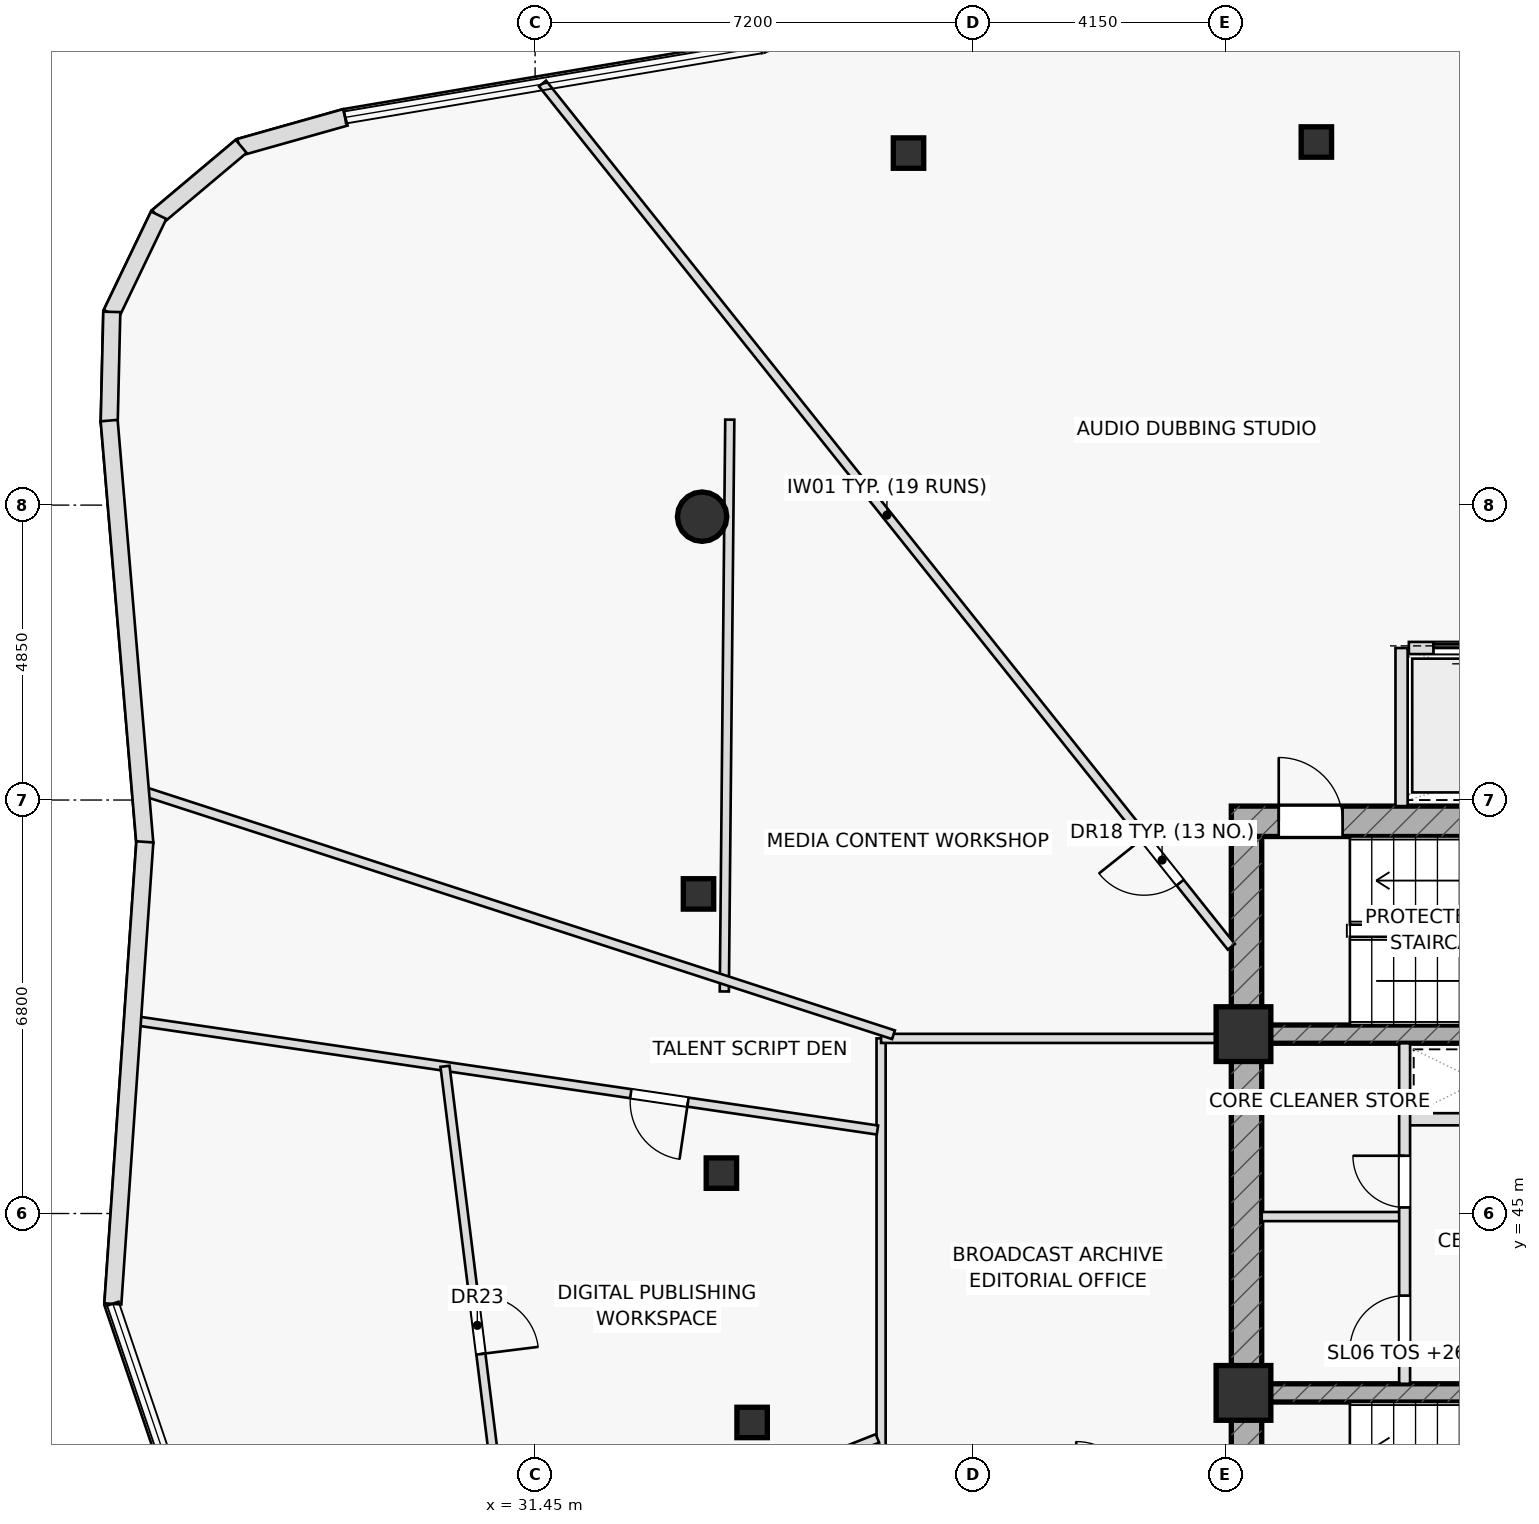
"""IFC4 building model, lengths in metres.
Left out: names, types, materials, properties, quantities, classifications, styles, units other than length and angle.
Written with IfcOpenShell. Run it as: python <this file> out.ifc"""

import sys

from ifc_helpers import new_model, si_unit, direction, frame, frame_2d, origin, origin_2d, place, context, subcontext, project, spatial, rectangle, hollow_rectangle, hollow_circle, extrude, element, fill, save


model = new_model("IFC4")
c1 = context("Model", 3, precision=1e-05, world=origin(), true_north=direction((0.0, 1.0)))
c2 = subcontext(c1, "Body", "Model", "MODEL_VIEW")
j1 = project(units=[si_unit("LENGTHUNIT", "METRE"), si_unit("PLANEANGLEUNIT", "RADIAN")], contexts=[c1])
p1 = place(None, origin())
s1 = spatial("IfcSite", under=j1, at=p1, CompositionType="ELEMENT")
p2 = place(p1, origin())
s2 = spatial("IfcBuilding", under=s1, at=p2, CompositionType="ELEMENT")
p3 = place(p2, frame((0.0, 0.0, 261.65)))
s3 = spatial("IfcBuildingStorey", under=s2, at=p3, CompositionType="ELEMENT", Elevation=261.65)
p4 = place(p3, frame((42.9, 51.45, 0.0), z_axis=(0.0, 0.0, 1.0), x_axis=(1.0, 0.0, 0.0)))
e1 = element("IfcWall", 1, at=p4, inside=s3, PredefinedType="SHEAR", context=c2, shape_type="SweptSolid", body=[
    extrude(rectangle(XDim=14.2, YDim=0.5, at=frame_2d((7.1, 0.0))), origin(), (0.0, 0.0, 1.0), 3.65),
])
p5 = place(p4, frame((0.78, 0.0, 0.0)))
e2 = element("IfcOpeningElement", 2, at=p5, cuts=e1, PredefinedType="OPENING", context=c2, shape_type="SweptSolid", body=[
    extrude(rectangle(XDim=1.05, YDim=2.2, at=frame_2d((0.525, 1.1))), frame((0.0, 0.26, 0.0), z_axis=(0.0, -1.0, 0.0), x_axis=(1.0, 0.0, 0.0)), (0.0, 0.0, 1.0), 0.52),
])
p6 = place(p3, frame((43.15, 38.8, 0.0), z_axis=(0.0, 0.0, 1.0), x_axis=(0.0, 1.0, 0.0)))
e3 = element("IfcWall", 3, at=p6, inside=s3, PredefinedType="SHEAR", context=c2, shape_type="SweptSolid", body=[
    extrude(rectangle(XDim=12.4, YDim=0.5, at=frame_2d((6.2, 0.0))), origin(), (0.0, 0.0, 1.0), 3.65),
])
p7 = place(p3, frame((43.4, 47.95, 0.0), z_axis=(0.0, 0.0, 1.0), x_axis=(1.0, 0.0, 0.0)))
e4 = element("IfcWall", 4, at=p7, inside=s3, PredefinedType="SHEAR", context=c2, shape_type="SweptSolid", body=[
    extrude(rectangle(XDim=13.2, YDim=0.3, at=frame_2d((6.6, 0.0))), origin(), (0.0, 0.0, 1.0), 3.65),
])
p8 = place(p7, frame((8.345, 0.0, 0.0)))
e5 = element("IfcOpeningElement", 5, at=p8, cuts=e4, PredefinedType="OPENING", context=c2, shape_type="SweptSolid", body=[
    extrude(rectangle(XDim=1.15, YDim=2.2, at=frame_2d((0.575, 1.1))), frame((0.0, 0.16, 0.0), z_axis=(0.0, -1.0, 0.0), x_axis=(1.0, 0.0, 0.0)), (0.0, 0.0, 1.0), 0.32),
])
p9 = place(p7, frame((10.065, 0.0, 0.0)))
e6 = element("IfcOpeningElement", 6, at=p9, cuts=e4, PredefinedType="OPENING", context=c2, shape_type="SweptSolid", body=[
    extrude(rectangle(XDim=1.15, YDim=2.2, at=frame_2d((0.575, 1.1))), frame((0.0, 0.16, 0.0), z_axis=(0.0, -1.0, 0.0), x_axis=(1.0, 0.0, 0.0)), (0.0, 0.0, 1.0), 0.32),
])
p10 = place(p7, frame((11.645, 0.0, 0.0)))
e7 = element("IfcOpeningElement", 7, at=p10, cuts=e4, PredefinedType="OPENING", context=c2, shape_type="SweptSolid", body=[
    extrude(rectangle(XDim=1.15, YDim=2.2, at=frame_2d((0.575, 1.1))), frame((0.0, 0.16, 0.0), z_axis=(0.0, -1.0, 0.0), x_axis=(1.0, 0.0, 0.0)), (0.0, 0.0, 1.0), 0.32),
])
p11 = place(p3, frame((43.4, 42.05, 0.0), z_axis=(0.0, 0.0, 1.0), x_axis=(1.0, 0.0, 0.0)))
e8 = element("IfcWall", 8, at=p11, inside=s3, PredefinedType="SHEAR", context=c2, shape_type="SweptSolid", body=[
    extrude(rectangle(XDim=13.2, YDim=0.3, at=frame_2d((6.6, 0.0))), origin(), (0.0, 0.0, 1.0), 3.65),
])
p12 = place(p11, frame((9.1, 0.0, 0.0)))
e9 = element("IfcOpeningElement", 9, at=p12, cuts=e8, PredefinedType="OPENING", context=c2, shape_type="SweptSolid", body=[
    extrude(rectangle(XDim=1.5, YDim=2.2, at=frame_2d((0.75, 1.1))), frame((0.0, 0.16, 0.0), z_axis=(0.0, -1.0, 0.0), x_axis=(1.0, 0.0, 0.0)), (0.0, 0.0, 1.0), 0.32),
])
for number, where, z_axis, x_axis in (
    (10, (43.1, 47.95, 0.0), (0.0, 0.0, 1.0), (1.0, 0.0, 0.0)),
    (11, (43.1, 42.05, 0.0), (0.0, 0.0, 1.0), (1.0, 0.0, 0.0)),
):
    element("IfcColumn", number, at=place(p3, frame(where, z_axis=z_axis, x_axis=x_axis)), inside=s3, PredefinedType="COLUMN", context=c2, shape_type="SweptSolid", body=[
        extrude(rectangle(XDim=0.9, YDim=0.9, at=origin_2d()), origin(), (0.0, 0.0, 1.0), 3.65),
    ])
p13 = place(p3, frame((34.196, 56.46, 0.0), z_axis=(0.0, 0.0, 1.0), x_axis=(1.0, 0.0, 0.0)))
e12 = element("IfcColumn", 12, at=p13, inside=s3, PredefinedType="COLUMN", context=c2, shape_type="SweptSolid", body=[
    extrude(hollow_circle(Radius=0.406, WallThickness=0.036, at=origin_2d()), origin(), (0.0, 0.0, 1.0), 3.65),
])
for number, where, z_axis, x_axis in (
    (13, (34.137, 50.256, 0.0), (0.0, 0.0, 1.0), (1.0, 0.0, 0.0)),
    (14, (34.514, 45.665, 0.0), (0.0, 0.0, 1.0), (1.0, 0.0, 0.0)),
    (15, (35.019, 41.564, 0.0), (0.0, 0.0, 1.0), (1.0, 0.0, 0.0)),
    (16, (44.299, 62.621, 0.0), (0.0, 0.0, 1.0), (1.0, 0.0, 0.0)),
    (17, (37.591, 62.439, 0.0), (0.0, 0.0, 1.0), (1.0, 0.0, 0.0)),
):
    element("IfcColumn", number, at=place(p3, frame(where, z_axis=z_axis, x_axis=x_axis)), inside=s3, PredefinedType="COLUMN", context=c2, shape_type="SweptSolid", body=[
        extrude(hollow_rectangle(XDim=0.5, YDim=0.5, WallThickness=0.03, at=origin_2d()), origin(), (0.0, 0.0, 1.0), 3.65),
    ])
p14 = place(p3, frame((45.7, 51.7, 0.0), z_axis=(0.0, 0.0, 1.0), x_axis=(0.0, 1.0, 0.0)))
e18 = element("IfcWall", 18, at=p14, inside=s3, PredefinedType="PARTITIONING", context=c2, shape_type="SweptSolid", body=[
    extrude(rectangle(XDim=2.6, YDim=0.2, at=frame_2d((1.3, 0.0))), origin(), (0.0, 0.0, 1.0), 3.65),
])
p15 = place(p3, frame((45.75, 46.55, 0.0), z_axis=(0.0, 0.0, 1.0), x_axis=(1.0, 0.0, 0.0)))
e19 = element("IfcWall", 19, at=p15, inside=s3, PredefinedType="PARTITIONING", context=c2, shape_type="SweptSolid", body=[
    extrude(rectangle(XDim=2.4, YDim=0.2, at=frame_2d((1.2, 0.0))), origin(), (0.0, 0.0, 1.0), 3.65),
])
p16 = place(p3, frame((43.4, 44.95, 0.0), z_axis=(0.0, 0.0, 1.0), x_axis=(1.0, 0.0, 0.0)))
e20 = element("IfcWall", 20, at=p16, inside=s3, PredefinedType="PARTITIONING", context=c2, shape_type="SweptSolid", body=[
    extrude(rectangle(XDim=2.35, YDim=0.15, at=frame_2d((1.175, 0.0))), origin(), (0.0, 0.0, 1.0), 3.65),
])
p17 = place(p3, frame((45.75, 42.2, 0.0), z_axis=(0.0, 0.0, 1.0), x_axis=(0.0, 1.0, 0.0)))
e21 = element("IfcWall", 21, at=p17, inside=s3, PredefinedType="PARTITIONING", context=c2, shape_type="SweptSolid", body=[
    extrude(rectangle(XDim=5.6, YDim=0.18, at=frame_2d((2.8, 0.0))), origin(), (0.0, 0.0, 1.0), 3.65),
])
p18 = place(p17, frame((0.55, 0.0, 0.0)))
e22 = element("IfcOpeningElement", 22, at=p18, cuts=e21, PredefinedType="OPENING", context=c2, shape_type="SweptSolid", body=[
    extrude(rectangle(XDim=0.9, YDim=2.05, at=frame_2d((0.45, 1.025))), frame((0.0, 0.1, 0.0), z_axis=(0.0, -1.0, 0.0), x_axis=(1.0, 0.0, 0.0)), (0.0, 0.0, 1.0), 0.2),
])
p19 = place(p17, frame((2.9, 0.0, 0.0)))
e23 = element("IfcOpeningElement", 23, at=p19, cuts=e21, PredefinedType="OPENING", context=c2, shape_type="SweptSolid", body=[
    extrude(rectangle(XDim=0.85, YDim=2.05, at=frame_2d((0.425, 1.025))), frame((0.0, 0.1, 0.0), z_axis=(0.0, -1.0, 0.0), x_axis=(1.0, 0.0, 0.0)), (0.0, 0.0, 1.0), 0.2),
])
p20 = place(p3, frame((34.652, 58.056, 0.0), z_axis=(0.0, 0.0, 1.0), x_axis=(-0.009553538759, -0.999954363907, 0.0)))
e24 = element("IfcWall", 24, at=p20, inside=s3, PredefinedType="PARTITIONING", context=c2, shape_type="SweptSolid", body=[
    extrude(rectangle(XDim=9.404, YDim=0.15, at=frame_2d((4.702, 0.0))), origin(), (0.0, 0.0, 1.0), 3.175),
])
p21 = place(p3, frame((37.14, 40.3, 0.0), z_axis=(0.0, 0.0, 1.0), x_axis=(0.0, 1.0, 0.0)))
e25 = element("IfcWall", 25, at=p21, inside=s3, PredefinedType="PARTITIONING", context=c2, shape_type="SweptSolid", body=[
    extrude(rectangle(XDim=7.58, YDim=0.15, at=frame_2d((3.79, 0.0))), origin(), (0.0, 0.0, 1.0), 3.65),
])
p22 = place(p3, frame((37.14, 47.88, 0.0), z_axis=(0.0, 0.0, 1.0), x_axis=(1.0, 0.0, 0.0)))
e26 = element("IfcWall", 26, at=p22, inside=s3, PredefinedType="PARTITIONING", context=c2, shape_type="SweptSolid", body=[
    extrude(rectangle(XDim=5.76, YDim=0.15, at=frame_2d((2.88, 0.0))), origin(), (0.0, 0.0, 1.0), 3.075),
])
p23 = place(p3, frame((42.9, 49.386, 0.0), z_axis=(0.0, 0.0, 1.0), x_axis=(-0.623702774592, 0.781661594916, 0.0)))
e27 = element("IfcWall", 27, at=p23, inside=s3, PredefinedType="PARTITIONING", context=c2, shape_type="SweptSolid", body=[
    extrude(rectangle(XDim=18.162, YDim=0.15, at=frame_2d((9.081, 0.0))), origin(), (0.0, 0.0, 1.0), 3.075),
])
p24 = place(p23, frame((1.35, 0.0, 0.0)))
e28 = element("IfcOpeningElement", 28, at=p24, cuts=e27, PredefinedType="OPENING", context=c2, shape_type="SweptSolid", body=[
    extrude(rectangle(XDim=0.95, YDim=2.05, at=frame_2d((0.475, 1.025))), frame((0.0, 0.085, 0.0), z_axis=(0.0, -1.0, 0.0), x_axis=(1.0, 0.0, 0.0)), (0.0, 0.0, 1.0), 0.17),
])
p25 = place(p3, frame((37.344, 47.94, 0.0), z_axis=(0.0, 0.0, 1.0), x_axis=(-0.951130517785, 0.308789148348, 0.0)))
e29 = element("IfcWall", 29, at=p25, inside=s3, PredefinedType="PARTITIONING", context=c2, shape_type="SweptSolid", body=[
    extrude(rectangle(XDim=13.034, YDim=0.15, at=frame_2d((6.517, 0.0))), origin(), (0.0, 0.0, 1.0), 3.175),
])
p26 = place(p3, frame((37.08, 46.373, 0.0), z_axis=(0.0, 0.0, 1.0), x_axis=(-0.989321908316, 0.145746909836, 0.0)))
e30 = element("IfcWall", 30, at=p26, inside=s3, PredefinedType="PARTITIONING", context=c2, shape_type="SweptSolid", body=[
    extrude(rectangle(XDim=12.394, YDim=0.15, at=frame_2d((6.197, 0.0))), origin(), (0.0, 0.0, 1.0), 3.075),
])
p27 = place(p26, frame((3.15, 0.0, 0.0)))
e31 = element("IfcOpeningElement", 31, at=p27, cuts=e30, PredefinedType="OPENING", context=c2, shape_type="SweptSolid", body=[
    extrude(rectangle(XDim=0.95, YDim=2.05, at=frame_2d((0.475, 1.025))), frame((0.0, 0.085, 0.0), z_axis=(0.0, -1.0, 0.0), x_axis=(1.0, 0.0, 0.0)), (0.0, 0.0, 1.0), 0.17),
])
p28 = place(p3, frame((37.08, 41.302, 0.0), z_axis=(0.0, 0.0, 1.0), x_axis=(-0.929496393642, -0.368831200154, 0.0)))
e32 = element("IfcWall", 32, at=p28, inside=s3, PredefinedType="PARTITIONING", context=c2, shape_type="SweptSolid", body=[
    extrude(rectangle(XDim=11.222, YDim=0.15, at=frame_2d((5.611, 0.0))), origin(), (0.0, 0.0, 1.0), 3.075),
])
p29 = place(p28, frame((2.55, 0.0, 0.0)))
e33 = element("IfcOpeningElement", 33, at=p29, cuts=e32, PredefinedType="OPENING", context=c2, shape_type="SweptSolid", body=[
    extrude(rectangle(XDim=0.95, YDim=2.05, at=frame_2d((0.475, 1.025))), frame((0.0, 0.085, 0.0), z_axis=(0.0, -1.0, 0.0), x_axis=(1.0, 0.0, 0.0)), (0.0, 0.0, 1.0), 0.17),
])
p30 = place(p3, frame((29.968, 47.421, 0.0), z_axis=(0.0, 0.0, 1.0), x_axis=(0.123667248189, -0.992323743405, 0.0)))
e34 = element("IfcWall", 34, at=p30, inside=s3, PredefinedType="PARTITIONING", context=c2, shape_type="SweptSolid", body=[
    extrude(rectangle(XDim=8.586, YDim=0.15, at=frame_2d((4.293, 0.0))), origin(), (0.0, 0.0, 1.0), 3.65),
])
p31 = place(p30, frame((3.818, 0.0, 0.0)))
e35 = element("IfcOpeningElement", 35, at=p31, cuts=e34, PredefinedType="OPENING", context=c2, shape_type="SweptSolid", body=[
    extrude(rectangle(XDim=0.95, YDim=2.05, at=frame_2d((0.475, 1.025))), frame((0.0, 0.085, 0.0), z_axis=(0.0, -1.0, 0.0), x_axis=(1.0, 0.0, 0.0)), (0.0, 0.0, 1.0), 0.17),
])
p32 = place(p3, frame((28.329, 63.026, 0.0), z_axis=(0.0, 0.0, 1.0), x_axis=(-0.962471391601, -0.271383161506, 0.0)))
e36 = element("IfcWall", 36, at=p32, inside=s3, PredefinedType="STANDARD", context=c2, shape_type="SweptSolid", body=[
    extrude(rectangle(XDim=1.807, YDim=0.28, at=frame_2d((0.904, 0.0))), origin(), (0.0, 0.0, 1.0), 3.65),
])
p33 = place(p3, frame((26.615, 62.55, 0.0), z_axis=(0.0, 0.0, 1.0), x_axis=(-0.765461031338, -0.643482252672, 0.0)))
e37 = element("IfcWall", 37, at=p33, inside=s3, PredefinedType="STANDARD", context=c2, shape_type="SweptSolid", body=[
    extrude(rectangle(XDim=1.795, YDim=0.28, at=frame_2d((0.898, 0.0))), origin(), (0.0, 0.0, 1.0), 3.65),
])
p34 = place(p3, frame((25.259, 61.417, 0.0), z_axis=(0.0, 0.0, 1.0), x_axis=(-0.432907864888, -0.901438173431, 0.0)))
e38 = element("IfcWall", 38, at=p34, inside=s3, PredefinedType="STANDARD", context=c2, shape_type="SweptSolid", body=[
    extrude(rectangle(XDim=1.796, YDim=0.28, at=frame_2d((0.898, 0.0))), origin(), (0.0, 0.0, 1.0), 3.65),
])
p35 = place(p3, frame((24.488, 59.827, 0.0), z_axis=(0.0, 0.0, 1.0), x_axis=(-0.023502372608, -0.999723781092, 0.0)))
e39 = element("IfcWall", 39, at=p35, inside=s3, PredefinedType="STANDARD", context=c2, shape_type="SweptSolid", body=[
    extrude(rectangle(XDim=1.818, YDim=0.28, at=frame_2d((0.909, 0.0))), origin(), (0.0, 0.0, 1.0), 3.65),
])
p36 = place(p3, frame((24.445, 58.04, 0.0), z_axis=(0.0, 0.0, 1.0), x_axis=(0.084087104255, -0.996458408012, 0.0)))
e40 = element("IfcWall", 40, at=p36, inside=s3, PredefinedType="STANDARD", context=c2, shape_type="SweptSolid", body=[
    extrude(rectangle(XDim=6.983, YDim=0.28, at=frame_2d((3.491, 0.0))), origin(), (0.0, 0.0, 1.0), 3.65),
])
p37 = place(p3, frame((25.031, 51.112, 0.0), z_axis=(0.0, 0.0, 1.0), x_axis=(-0.069110117755, -0.997609037461, 0.0)))
e41 = element("IfcWall", 41, at=p37, inside=s3, PredefinedType="STANDARD", context=c2, shape_type="SweptSolid", body=[
    extrude(rectangle(XDim=7.616, YDim=0.28, at=frame_2d((3.808, 0.0))), origin(), (0.0, 0.0, 1.0), 3.65),
])
p38 = place(p3, frame((45.82, 54.3, 0.0), z_axis=(0.0, 0.0, 1.0), x_axis=(1.0, 0.0, 0.0)))
e42 = element("IfcWall", 42, at=p38, inside=s3, PredefinedType="PARTITIONING", context=c2, shape_type="SweptSolid", body=[
    extrude(rectangle(XDim=8.31, YDim=0.2, at=frame_2d((4.155, 0.0))), origin(), (0.0, 0.0, 1.0), 3.65),
])
p39 = place(p38, frame((0.405, 0.0, 0.0)))
e43 = element("IfcOpeningElement", 43, at=p39, cuts=e42, PredefinedType="OPENING", context=c2, shape_type="SweptSolid", body=[
    extrude(rectangle(XDim=1.1, YDim=2.15, at=frame_2d((0.55, 1.075))), frame((0.0, 0.11, 0.0), z_axis=(0.0, -1.0, 0.0), x_axis=(1.0, 0.0, 0.0)), (0.0, 0.0, 1.0), 0.22),
])
p40 = place(p38, frame((2.505, 0.0, 0.0)))
e44 = element("IfcOpeningElement", 44, at=p40, cuts=e42, PredefinedType="OPENING", context=c2, shape_type="SweptSolid", body=[
    extrude(rectangle(XDim=1.1, YDim=2.15, at=frame_2d((0.55, 1.075))), frame((0.0, 0.11, 0.0), z_axis=(0.0, -1.0, 0.0), x_axis=(1.0, 0.0, 0.0)), (0.0, 0.0, 1.0), 0.22),
])
p41 = place(p38, frame((4.605, 0.0, 0.0)))
e45 = element("IfcOpeningElement", 45, at=p41, cuts=e42, PredefinedType="OPENING", context=c2, shape_type="SweptSolid", body=[
    extrude(rectangle(XDim=1.1, YDim=2.15, at=frame_2d((0.55, 1.075))), frame((0.0, 0.11, 0.0), z_axis=(0.0, -1.0, 0.0), x_axis=(1.0, 0.0, 0.0)), (0.0, 0.0, 1.0), 0.22),
])
p42 = place(p38, frame((6.705, 0.0, 0.0)))
e46 = element("IfcOpeningElement", 46, at=p42, cuts=e42, PredefinedType="OPENING", context=c2, shape_type="SweptSolid", body=[
    extrude(rectangle(XDim=1.1, YDim=2.15, at=frame_2d((0.55, 1.075))), frame((0.0, 0.11, 0.0), z_axis=(0.0, -1.0, 0.0), x_axis=(1.0, 0.0, 0.0)), (0.0, 0.0, 1.0), 0.22),
])
p43 = place(p5, origin())
e47 = element("IfcDoor", 47, at=p43, inside=s3, OperationType="SINGLE_SWING_LEFT", PredefinedType="DOOR", context=c2, shape_type="SweptSolid", body=[
    extrude(rectangle(XDim=1.05, YDim=2.2, at=frame_2d((0.525, 1.1))), frame((0.0, 0.025, 0.0), z_axis=(0.0, -1.0, 0.0), x_axis=(1.0, 0.0, 0.0)), (0.0, 0.0, 1.0), 0.05),
])
fill(e2, e47)
p44 = place(p18, origin())
e48 = element("IfcDoor", 48, at=p44, inside=s3, OperationType="SINGLE_SWING_LEFT", PredefinedType="DOOR", context=c2, shape_type="SweptSolid", body=[
    extrude(rectangle(XDim=0.9, YDim=2.05, at=frame_2d((0.45, 1.025))), frame((0.0, 0.025, 0.0), z_axis=(0.0, -1.0, 0.0), x_axis=(1.0, 0.0, 0.0)), (0.0, 0.0, 1.0), 0.05),
])
fill(e22, e48)
p45 = place(p19, origin())
e49 = element("IfcDoor", 49, at=p45, inside=s3, OperationType="SINGLE_SWING_RIGHT", PredefinedType="DOOR", context=c2, shape_type="SweptSolid", body=[
    extrude(rectangle(XDim=0.85, YDim=2.05, at=frame_2d((0.425, 1.025))), frame((0.0, 0.025, 0.0), z_axis=(0.0, -1.0, 0.0), x_axis=(1.0, 0.0, 0.0)), (0.0, 0.0, 1.0), 0.05),
])
fill(e23, e49)
p46 = place(p24, origin())
e50 = element("IfcDoor", 50, at=p46, inside=s3, OperationType="SINGLE_SWING_RIGHT", PredefinedType="DOOR", context=c2, shape_type="SweptSolid", body=[
    extrude(rectangle(XDim=0.95, YDim=2.05, at=frame_2d((0.475, 1.025))), frame((0.0, 0.025, 0.0), z_axis=(0.0, -1.0, 0.0), x_axis=(1.0, 0.0, 0.0)), (0.0, 0.0, 1.0), 0.05),
])
fill(e28, e50)
p47 = place(p27, origin())
e51 = element("IfcDoor", 51, at=p47, inside=s3, OperationType="SINGLE_SWING_LEFT", PredefinedType="DOOR", context=c2, shape_type="SweptSolid", body=[
    extrude(rectangle(XDim=0.95, YDim=2.05, at=frame_2d((0.475, 1.025))), frame((0.0, 0.025, 0.0), z_axis=(0.0, -1.0, 0.0), x_axis=(1.0, 0.0, 0.0)), (0.0, 0.0, 1.0), 0.05),
])
fill(e31, e51)
p48 = place(p31, origin())
e52 = element("IfcDoor", 52, at=p48, inside=s3, OperationType="SINGLE_SWING_RIGHT", PredefinedType="DOOR", context=c2, shape_type="SweptSolid", body=[
    extrude(rectangle(XDim=0.95, YDim=2.05, at=frame_2d((0.475, 1.025))), frame((0.0, 0.025, 0.0), z_axis=(0.0, -1.0, 0.0), x_axis=(1.0, 0.0, 0.0)), (0.0, 0.0, 1.0), 0.05),
])
fill(e35, e52)
p49 = place(p39, origin())
e53 = element("IfcDoor", 53, at=p49, inside=s3, OperationType="SLIDING_TO_LEFT", PredefinedType="DOOR", context=c2, shape_type="SweptSolid", body=[
    extrude(rectangle(XDim=1.1, YDim=2.15, at=frame_2d((0.55, 1.075))), frame((0.0, 0.025, 0.0), z_axis=(0.0, -1.0, 0.0), x_axis=(1.0, 0.0, 0.0)), (0.0, 0.0, 1.0), 0.05),
])
fill(e43, e53)
save(model, sys.argv[1])
